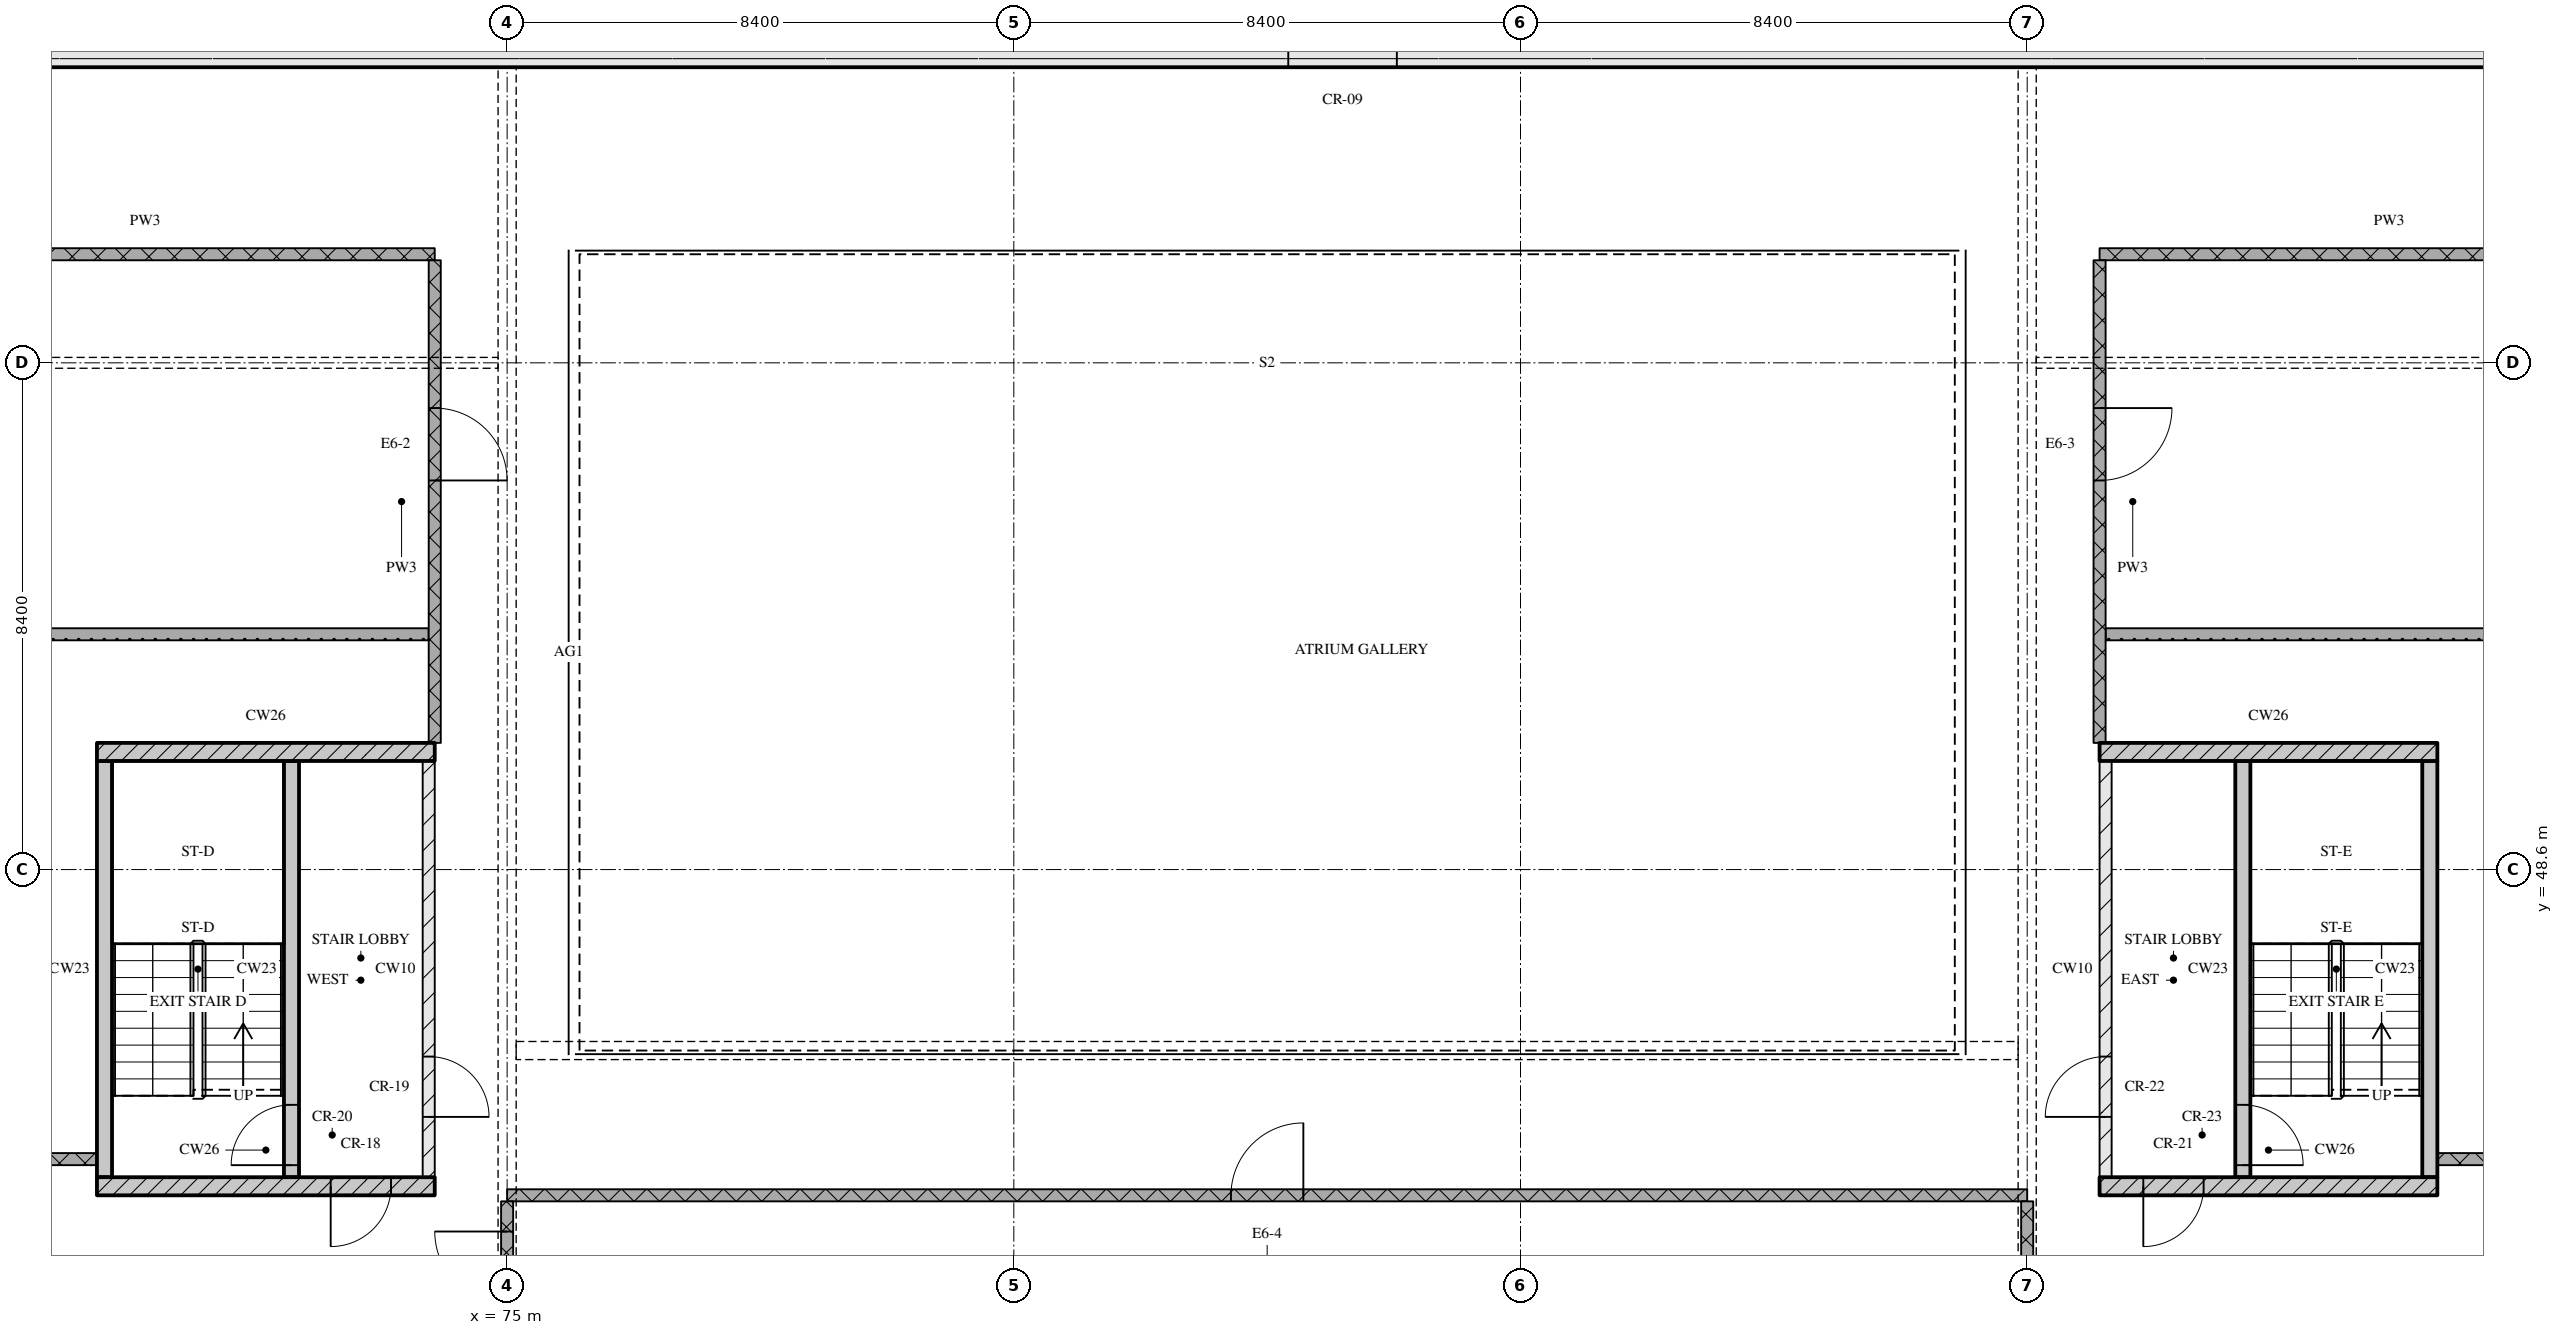
"""IFC4 building model, lengths in metres.
Left out: names, types, materials, properties, quantities, classifications, styles, units other than length and angle.
Written with IfcOpenShell. Run it as: python <this file> out.ifc"""

import sys

from ifc_helpers import new_model, si_unit, direction, frame, frame_2d, origin, place, context, subcontext, project, spatial, rectangle, extrude, element, fill, save


model = new_model("IFC4")
c1 = context("Model", 3, precision=1e-05, world=origin(), true_north=direction((0.0, 1.0)))
c2 = subcontext(c1, "Body", "Model", "MODEL_VIEW")
j1 = project(units=[si_unit("LENGTHUNIT", "METRE"), si_unit("PLANEANGLEUNIT", "RADIAN")], contexts=[c1])
p1 = place(None, origin())
s1 = spatial("IfcSite", under=j1, at=p1, CompositionType="ELEMENT")
p2 = place(p1, origin())
s2 = spatial("IfcBuilding", under=s1, at=p2, CompositionType="ELEMENT")
p3 = place(p2, frame((0.0, 0.0, 306.75)))
s3 = spatial("IfcBuildingStorey", under=s2, at=p3, CompositionType="ELEMENT", Elevation=306.75)
p4 = place(p3, frame((67.3, 62.15, 0.0), z_axis=(0.0, 0.0, 1.0), x_axis=(1.0, 0.0, 0.0)))
e1 = element("IfcWall", 1, at=p4, inside=s3, PredefinedType="SOLIDWALL", context=c2, shape_type="SweptSolid", body=[
    extrude(rectangle(XDim=40.6, YDim=0.5, at=frame_2d((20.3, 0.0))), origin(), (0.0, 0.0, 1.0), 3.3),
])
p5 = place(p4, frame((20.65, 0.0, 0.0)))
e2 = element("IfcOpeningElement", 2, at=p5, cuts=e1, PredefinedType="OPENING", context=c2, shape_type="SweptSolid", body=[
    extrude(rectangle(XDim=1.8, YDim=2.1, at=frame_2d((0.9, 1.05))), frame((0.0, 0.26, 0.0), z_axis=(0.0, -1.0, 0.0), x_axis=(1.0, 0.0, 0.0)), (0.0, 0.0, 1.0), 0.52),
])
p6 = place(p3, frame((68.2, 43.35, 0.0), z_axis=(0.0, 0.0, 1.0), x_axis=(1.0, 0.0, 0.0)))
e3 = element("IfcWall", 3, at=p6, inside=s3, PredefinedType="SOLIDWALL", context=c2, shape_type="SweptSolid", body=[
    extrude(rectangle(XDim=5.6, YDim=0.3, at=frame_2d((2.8, 0.0))), origin(), (0.0, 0.0, 1.0), 3.3),
])
p7 = place(p6, frame((3.875, 0.0, 0.0)))
e4 = element("IfcOpeningElement", 4, at=p7, cuts=e3, PredefinedType="OPENING", context=c2, shape_type="SweptSolid", body=[
    extrude(rectangle(XDim=1.0, YDim=2.1, at=frame_2d((0.5, 1.05))), frame((0.0, 0.16, 0.0), z_axis=(0.0, -1.0, 0.0), x_axis=(1.0, 0.0, 0.0)), (0.0, 0.0, 1.0), 0.32),
])
p8 = place(p3, frame((68.325, 43.5, 0.0), z_axis=(0.0, 0.0, 1.0), x_axis=(0.0, 1.0, 0.0)))
e5 = element("IfcWall", 5, at=p8, inside=s3, PredefinedType="SOLIDWALL", context=c2, shape_type="SweptSolid", body=[
    extrude(rectangle(XDim=6.9, YDim=0.25, at=frame_2d((3.45, 0.0))), origin(), (0.0, 0.0, 1.0), 3.3),
])
p9 = place(p3, frame((71.425, 43.5, 0.0), z_axis=(0.0, 0.0, 1.0), x_axis=(0.0, 1.0, 0.0)))
e6 = element("IfcWall", 6, at=p9, inside=s3, PredefinedType="SOLIDWALL", context=c2, shape_type="SweptSolid", body=[
    extrude(rectangle(XDim=6.9, YDim=0.25, at=frame_2d((3.45, 0.0))), origin(), (0.0, 0.0, 1.0), 3.3),
])
p10 = place(p9, frame((0.2, 0.0, 0.0)))
e7 = element("IfcOpeningElement", 7, at=p10, cuts=e6, PredefinedType="OPENING", context=c2, shape_type="SweptSolid", body=[
    extrude(rectangle(XDim=1.0, YDim=2.1, at=frame_2d((0.5, 1.05))), frame((0.0, 0.135, 0.0), z_axis=(0.0, -1.0, 0.0), x_axis=(1.0, 0.0, 0.0)), (0.0, 0.0, 1.0), 0.27),
])
p11 = place(p3, frame((73.7, 43.5, 0.0), z_axis=(0.0, 0.0, 1.0), x_axis=(0.0, 1.0, 0.0)))
e8 = element("IfcWall", 8, at=p11, inside=s3, PredefinedType="PARTITIONING", context=c2, shape_type="SweptSolid", body=[
    extrude(rectangle(XDim=6.9, YDim=0.2, at=frame_2d((3.45, 0.0))), origin(), (0.0, 0.0, 1.0), 3.3),
])
p12 = place(p11, frame((1.0, 0.0, 0.0)))
e9 = element("IfcOpeningElement", 9, at=p12, cuts=e8, PredefinedType="OPENING", context=c2, shape_type="SweptSolid", body=[
    extrude(rectangle(XDim=1.0, YDim=2.1, at=frame_2d((0.5, 1.05))), frame((0.0, 0.11, 0.0), z_axis=(0.0, -1.0, 0.0), x_axis=(1.0, 0.0, 0.0)), (0.0, 0.0, 1.0), 0.22),
])
p13 = place(p3, frame((68.2, 50.55, 0.0), z_axis=(0.0, 0.0, 1.0), x_axis=(1.0, 0.0, 0.0)))
e10 = element("IfcWall", 10, at=p13, inside=s3, PredefinedType="SOLIDWALL", context=c2, shape_type="SweptSolid", body=[
    extrude(rectangle(XDim=5.6, YDim=0.3, at=frame_2d((2.8, 0.0))), origin(), (0.0, 0.0, 1.0), 3.3),
])
p14 = place(p3, frame((101.4, 43.35, 0.0), z_axis=(0.0, 0.0, 1.0), x_axis=(1.0, 0.0, 0.0)))
e11 = element("IfcWall", 11, at=p14, inside=s3, PredefinedType="SOLIDWALL", context=c2, shape_type="SweptSolid", body=[
    extrude(rectangle(XDim=5.6, YDim=0.3, at=frame_2d((2.8, 0.0))), origin(), (0.0, 0.0, 1.0), 3.3),
])
p15 = place(p14, frame((0.725, 0.0, 0.0)))
e12 = element("IfcOpeningElement", 12, at=p15, cuts=e11, PredefinedType="OPENING", context=c2, shape_type="SweptSolid", body=[
    extrude(rectangle(XDim=1.0, YDim=2.1, at=frame_2d((0.5, 1.05))), frame((0.0, 0.16, 0.0), z_axis=(0.0, -1.0, 0.0), x_axis=(1.0, 0.0, 0.0)), (0.0, 0.0, 1.0), 0.32),
])
p16 = place(p3, frame((101.5, 43.5, 0.0), z_axis=(0.0, 0.0, 1.0), x_axis=(0.0, 1.0, 0.0)))
e13 = element("IfcWall", 13, at=p16, inside=s3, PredefinedType="PARTITIONING", context=c2, shape_type="SweptSolid", body=[
    extrude(rectangle(XDim=6.9, YDim=0.2, at=frame_2d((3.45, 0.0))), origin(), (0.0, 0.0, 1.0), 3.3),
])
p17 = place(p16, frame((1.0, 0.0, 0.0)))
e14 = element("IfcOpeningElement", 14, at=p17, cuts=e13, PredefinedType="OPENING", context=c2, shape_type="SweptSolid", body=[
    extrude(rectangle(XDim=1.0, YDim=2.1, at=frame_2d((0.5, 1.05))), frame((0.0, 0.11, 0.0), z_axis=(0.0, -1.0, 0.0), x_axis=(1.0, 0.0, 0.0)), (0.0, 0.0, 1.0), 0.22),
])
p18 = place(p3, frame((103.775, 43.5, 0.0), z_axis=(0.0, 0.0, 1.0), x_axis=(0.0, 1.0, 0.0)))
e15 = element("IfcWall", 15, at=p18, inside=s3, PredefinedType="SOLIDWALL", context=c2, shape_type="SweptSolid", body=[
    extrude(rectangle(XDim=6.9, YDim=0.25, at=frame_2d((3.45, 0.0))), origin(), (0.0, 0.0, 1.0), 3.3),
])
p19 = place(p18, frame((0.2, 0.0, 0.0)))
e16 = element("IfcOpeningElement", 16, at=p19, cuts=e15, PredefinedType="OPENING", context=c2, shape_type="SweptSolid", body=[
    extrude(rectangle(XDim=1.0, YDim=2.1, at=frame_2d((0.5, 1.05))), frame((0.0, 0.135, 0.0), z_axis=(0.0, -1.0, 0.0), x_axis=(1.0, 0.0, 0.0)), (0.0, 0.0, 1.0), 0.27),
])
p20 = place(p3, frame((106.875, 43.5, 0.0), z_axis=(0.0, 0.0, 1.0), x_axis=(0.0, 1.0, 0.0)))
e17 = element("IfcWall", 17, at=p20, inside=s3, PredefinedType="SOLIDWALL", context=c2, shape_type="SweptSolid", body=[
    extrude(rectangle(XDim=6.9, YDim=0.25, at=frame_2d((3.45, 0.0))), origin(), (0.0, 0.0, 1.0), 3.3),
])
p21 = place(p3, frame((101.4, 50.55, 0.0), z_axis=(0.0, 0.0, 1.0), x_axis=(1.0, 0.0, 0.0)))
e18 = element("IfcWall", 18, at=p21, inside=s3, PredefinedType="SOLIDWALL", context=c2, shape_type="SweptSolid", body=[
    extrude(rectangle(XDim=5.6, YDim=0.3, at=frame_2d((2.8, 0.0))), origin(), (0.0, 0.0, 1.0), 3.3),
])
p22 = place(p3, frame((100.2, 43.2, 0.0), z_axis=(0.0, 0.0, 1.0), x_axis=(-1.0, 0.0, 0.0)))
e19 = element("IfcWall", 19, at=p22, inside=s3, PredefinedType="PARTITIONING", context=c2, shape_type="SweptSolid", body=[
    extrude(rectangle(XDim=25.2, YDim=0.2, at=frame_2d((12.6, 0.0))), origin(), (0.0, 0.0, 1.0), 3.3),
])
p23 = place(p22, frame((12.0, 0.0, 0.0)))
e20 = element("IfcOpeningElement", 20, at=p23, cuts=e19, PredefinedType="OPENING", context=c2, shape_type="SweptSolid", body=[
    extrude(rectangle(XDim=1.2, YDim=2.1, at=frame_2d((0.6, 1.05))), frame((0.0, 0.11, 0.0), z_axis=(0.0, -1.0, 0.0), x_axis=(1.0, 0.0, 0.0)), (0.0, 0.0, 1.0), 0.22),
])
p24 = place(p3, frame((60.6, 43.8, 0.0), z_axis=(0.0, 0.0, 1.0), x_axis=(1.0, 0.0, 0.0)))
e21 = element("IfcWall", 21, at=p24, inside=s3, PredefinedType="PARTITIONING", context=c2, shape_type="SweptSolid", body=[
    extrude(rectangle(XDim=7.6, YDim=0.2, at=frame_2d((3.8, 0.0))), origin(), (0.0, 0.0, 1.0), 3.3),
])
p25 = place(p24, frame((3.2, 0.0, 0.0)))
e22 = element("IfcOpeningElement", 22, at=p25, cuts=e21, PredefinedType="OPENING", context=c2, shape_type="SweptSolid", body=[
    extrude(rectangle(XDim=1.2, YDim=2.1, at=frame_2d((0.6, 1.05))), frame((0.0, 0.11, 0.0), z_axis=(0.0, -1.0, 0.0), x_axis=(1.0, 0.0, 0.0)), (0.0, 0.0, 1.0), 0.22),
])
p26 = place(p3, frame((107.0, 43.8, 0.0), z_axis=(0.0, 0.0, 1.0), x_axis=(1.0, 0.0, 0.0)))
e23 = element("IfcWall", 23, at=p26, inside=s3, PredefinedType="PARTITIONING", context=c2, shape_type="SweptSolid", body=[
    extrude(rectangle(XDim=7.6, YDim=0.2, at=frame_2d((3.8, 0.0))), origin(), (0.0, 0.0, 1.0), 3.3),
])
p27 = place(p26, frame((3.2, 0.0, 0.0)))
e24 = element("IfcOpeningElement", 24, at=p27, cuts=e23, PredefinedType="OPENING", context=c2, shape_type="SweptSolid", body=[
    extrude(rectangle(XDim=1.2, YDim=2.1, at=frame_2d((0.6, 1.05))), frame((0.0, 0.11, 0.0), z_axis=(0.0, -1.0, 0.0), x_axis=(1.0, 0.0, 0.0)), (0.0, 0.0, 1.0), 0.22),
])
for number, where, z_axis, x_axis in (
    (25, (56.68, 52.5, 0.0), (0.0, 0.0, 1.0), (1.0, 0.0, 0.0)),
    (26, (101.5, 52.5, 0.0), (0.0, 0.0, 1.0), (1.0, 0.0, 0.0)),
):
    element("IfcWall", number, at=place(p3, frame(where, z_axis=z_axis, x_axis=x_axis)), inside=s3, PredefinedType="PARTITIONING", context=c2, shape_type="SweptSolid", body=[
        extrude(rectangle(XDim=17.02, YDim=0.2, at=frame_2d((8.51, 0.0))), origin(), (0.0, 0.0, 1.0), 3.3),
    ])
for number, where, z_axis, x_axis in (
    (27, (64.2, 58.8, 0.0), (0.0, 0.0, 1.0), (1.0, 0.0, 0.0)),
    (28, (101.4, 58.8, 0.0), (0.0, 0.0, 1.0), (1.0, 0.0, 0.0)),
):
    element("IfcWall", number, at=place(p3, frame(where, z_axis=z_axis, x_axis=x_axis)), inside=s3, PredefinedType="PARTITIONING", context=c2, shape_type="SweptSolid", body=[
        extrude(rectangle(XDim=9.6, YDim=0.2, at=frame_2d((4.8, 0.0))), origin(), (0.0, 0.0, 1.0), 3.3),
    ])
p28 = place(p3, frame((73.8, 50.7, 0.0), z_axis=(0.0, 0.0, 1.0), x_axis=(0.0, 1.0, 0.0)))
e29 = element("IfcWall", 29, at=p28, inside=s3, PredefinedType="PARTITIONING", context=c2, shape_type="SweptSolid", body=[
    extrude(rectangle(XDim=8.0, YDim=0.2, at=frame_2d((4.0, 0.0))), origin(), (0.0, 0.0, 1.0), 3.3),
])
p29 = place(p28, frame((4.35, 0.0, 0.0)))
e30 = element("IfcOpeningElement", 30, at=p29, cuts=e29, PredefinedType="OPENING", context=c2, shape_type="SweptSolid", body=[
    extrude(rectangle(XDim=1.2, YDim=2.1, at=frame_2d((0.6, 1.05))), frame((0.0, 0.11, 0.0), z_axis=(0.0, -1.0, 0.0), x_axis=(1.0, 0.0, 0.0)), (0.0, 0.0, 1.0), 0.22),
])
p30 = place(p3, frame((75.0, 43.1, 0.0), z_axis=(0.0, 0.0, 1.0), x_axis=(0.0, -1.0, 0.0)))
e31 = element("IfcWall", 31, at=p30, inside=s3, PredefinedType="PARTITIONING", context=c2, shape_type="SweptSolid", body=[
    extrude(rectangle(XDim=2.2, YDim=0.2, at=frame_2d((1.1, 0.0))), origin(), (0.0, 0.0, 1.0), 2.51),
])
p31 = place(p30, frame((0.5, 0.0, 0.0)))
e32 = element("IfcOpeningElement", 32, at=p31, cuts=e31, PredefinedType="OPENING", context=c2, shape_type="SweptSolid", body=[
    extrude(rectangle(XDim=1.2, YDim=2.1, at=frame_2d((0.6, 1.05))), frame((0.0, 0.11, 0.0), z_axis=(0.0, -1.0, 0.0), x_axis=(1.0, 0.0, 0.0)), (0.0, 0.0, 1.0), 0.22),
])
p32 = place(p3, frame((100.2, 43.1, 0.0), z_axis=(0.0, 0.0, 1.0), x_axis=(0.0, -1.0, 0.0)))
e33 = element("IfcWall", 33, at=p32, inside=s3, PredefinedType="PARTITIONING", context=c2, shape_type="SweptSolid", body=[
    extrude(rectangle(XDim=2.2, YDim=0.2, at=frame_2d((1.1, 0.0))), origin(), (0.0, 0.0, 1.0), 2.51),
])
p33 = place(p3, frame((101.4, 58.7, 0.0), z_axis=(0.0, 0.0, 1.0), x_axis=(0.0, -1.0, 0.0)))
e34 = element("IfcWall", 34, at=p33, inside=s3, PredefinedType="PARTITIONING", context=c2, shape_type="SweptSolid", body=[
    extrude(rectangle(XDim=8.0, YDim=0.2, at=frame_2d((4.0, 0.0))), origin(), (0.0, 0.0, 1.0), 3.3),
])
p34 = place(p33, frame((2.45, 0.0, 0.0)))
e35 = element("IfcOpeningElement", 35, at=p34, cuts=e34, PredefinedType="OPENING", context=c2, shape_type="SweptSolid", body=[
    extrude(rectangle(XDim=1.2, YDim=2.1, at=frame_2d((0.6, 1.05))), frame((0.0, 0.11, 0.0), z_axis=(0.0, -1.0, 0.0), x_axis=(1.0, 0.0, 0.0)), (0.0, 0.0, 1.0), 0.22),
])
p35 = place(p5, origin())
e36 = element("IfcDoor", 36, at=p35, inside=s3, OperationType="DOUBLE_DOOR_SINGLE_SWING", PredefinedType="DOOR", context=c2, shape_type="SweptSolid", body=[
    extrude(rectangle(XDim=1.8, YDim=2.1, at=frame_2d((0.9, 1.05))), frame((0.0, 0.025, 0.0), z_axis=(0.0, -1.0, 0.0), x_axis=(1.0, 0.0, 0.0)), (0.0, 0.0, 1.0), 0.05),
])
fill(e2, e36)
p36 = place(p7, origin())
e37 = element("IfcDoor", 37, at=p36, inside=s3, OperationType="SINGLE_SWING_RIGHT", PredefinedType="DOOR", context=c2, shape_type="SweptSolid", body=[
    extrude(rectangle(XDim=1.0, YDim=2.1, at=frame_2d((0.5, 1.05))), frame((0.0, 0.025, 0.0), z_axis=(0.0, -1.0, 0.0), x_axis=(1.0, 0.0, 0.0)), (0.0, 0.0, 1.0), 0.05),
])
fill(e4, e37)
p37 = place(p10, origin())
e38 = element("IfcDoor", 38, at=p37, inside=s3, OperationType="SINGLE_SWING_LEFT", PredefinedType="DOOR", context=c2, shape_type="SweptSolid", body=[
    extrude(rectangle(XDim=1.0, YDim=2.1, at=frame_2d((0.5, 1.05))), frame((0.0, 0.025, 0.0), z_axis=(0.0, -1.0, 0.0), x_axis=(1.0, 0.0, 0.0)), (0.0, 0.0, 1.0), 0.05),
])
fill(e7, e38)
p38 = place(p12, origin())
e39 = element("IfcDoor", 39, at=p38, inside=s3, OperationType="SINGLE_SWING_RIGHT", PredefinedType="DOOR", context=c2, shape_type="SweptSolid", body=[
    extrude(rectangle(XDim=1.0, YDim=2.1, at=frame_2d((0.5, 1.05))), frame((0.0, 0.025, 0.0), z_axis=(0.0, -1.0, 0.0), x_axis=(1.0, 0.0, 0.0)), (0.0, 0.0, 1.0), 0.05),
])
fill(e9, e39)
p39 = place(p15, origin())
e40 = element("IfcDoor", 40, at=p39, inside=s3, OperationType="SINGLE_SWING_RIGHT", PredefinedType="DOOR", context=c2, shape_type="SweptSolid", body=[
    extrude(rectangle(XDim=1.0, YDim=2.1, at=frame_2d((0.5, 1.05))), frame((0.0, 0.025, 0.0), z_axis=(0.0, -1.0, 0.0), x_axis=(1.0, 0.0, 0.0)), (0.0, 0.0, 1.0), 0.05),
])
fill(e12, e40)
p40 = place(p19, origin())
e41 = element("IfcDoor", 41, at=p40, inside=s3, OperationType="SINGLE_SWING_RIGHT", PredefinedType="DOOR", context=c2, shape_type="SweptSolid", body=[
    extrude(rectangle(XDim=1.0, YDim=2.1, at=frame_2d((0.5, 1.05))), frame((0.0, 0.025, 0.0), z_axis=(0.0, -1.0, 0.0), x_axis=(1.0, 0.0, 0.0)), (0.0, 0.0, 1.0), 0.05),
])
fill(e16, e41)
p41 = place(p17, origin())
e42 = element("IfcDoor", 42, at=p41, inside=s3, OperationType="SINGLE_SWING_LEFT", PredefinedType="DOOR", context=c2, shape_type="SweptSolid", body=[
    extrude(rectangle(XDim=1.0, YDim=2.1, at=frame_2d((0.5, 1.05))), frame((0.0, 0.025, 0.0), z_axis=(0.0, -1.0, 0.0), x_axis=(1.0, 0.0, 0.0)), (0.0, 0.0, 1.0), 0.05),
])
fill(e14, e42)
p42 = place(p23, origin())
e43 = element("IfcDoor", 43, at=p42, inside=s3, OperationType="SINGLE_SWING_RIGHT", PredefinedType="DOOR", context=c2, shape_type="SweptSolid", body=[
    extrude(rectangle(XDim=1.2, YDim=2.1, at=frame_2d((0.6, 1.05))), frame((0.0, 0.025, 0.0), z_axis=(0.0, -1.0, 0.0), x_axis=(1.0, 0.0, 0.0)), (0.0, 0.0, 1.0), 0.05),
])
fill(e20, e43)
p43 = place(p29, origin())
e44 = element("IfcDoor", 44, at=p43, inside=s3, OperationType="SINGLE_SWING_RIGHT", PredefinedType="DOOR", context=c2, shape_type="SweptSolid", body=[
    extrude(rectangle(XDim=1.2, YDim=2.1, at=frame_2d((0.6, 1.05))), frame((0.0, 0.025, 0.0), z_axis=(0.0, -1.0, 0.0), x_axis=(1.0, 0.0, 0.0)), (0.0, 0.0, 1.0), 0.05),
])
fill(e30, e44)
p44 = place(p31, origin())
e45 = element("IfcDoor", 45, at=p44, inside=s3, OperationType="SINGLE_SWING_RIGHT", PredefinedType="DOOR", context=c2, shape_type="SweptSolid", body=[
    extrude(rectangle(XDim=1.2, YDim=2.1, at=frame_2d((0.6, 1.05))), frame((0.0, 0.025, 0.0), z_axis=(0.0, -1.0, 0.0), x_axis=(1.0, 0.0, 0.0)), (0.0, 0.0, 1.0), 0.05),
])
fill(e32, e45)
p45 = place(p34, origin())
e46 = element("IfcDoor", 46, at=p45, inside=s3, OperationType="SINGLE_SWING_LEFT", PredefinedType="DOOR", context=c2, shape_type="SweptSolid", body=[
    extrude(rectangle(XDim=1.2, YDim=2.1, at=frame_2d((0.6, 1.05))), frame((0.0, 0.025, 0.0), z_axis=(0.0, -1.0, 0.0), x_axis=(1.0, 0.0, 0.0)), (0.0, 0.0, 1.0), 0.05),
])
fill(e35, e46)
save(model, sys.argv[1])
